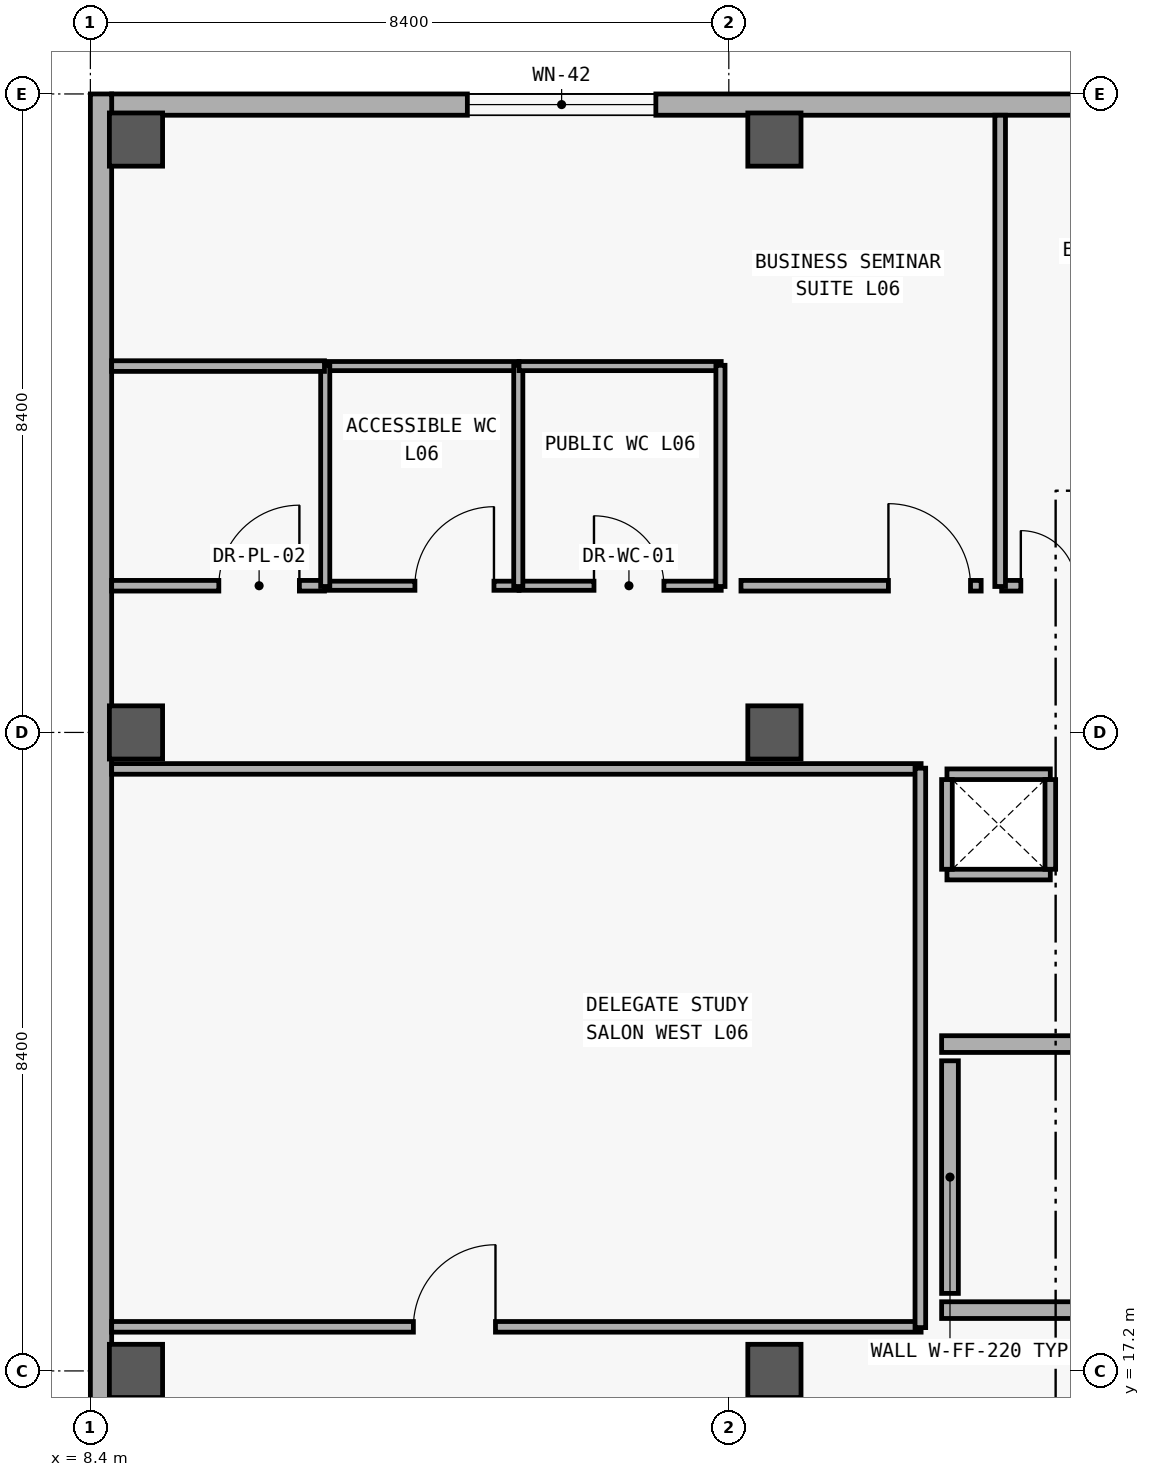
"""IFC4 building model, lengths in metres.
Left out: names, types, materials, properties, quantities, classifications, styles, units other than length and angle.
Written with IfcOpenShell. Run it as: python <this file> out.ifc"""

import sys

from ifc_helpers import new_model, si_unit, direction, frame, frame_2d, origin, origin_2d, place, context, subcontext, project, spatial, rectangle, extrude, element, fill, save


model = new_model("IFC4")
c1 = context("Model", 3, precision=1e-05, world=origin(), true_north=direction((0.0, 1.0)))
c2 = subcontext(c1, "Body", "Model", "MODEL_VIEW")
j1 = project(units=[si_unit("LENGTHUNIT", "METRE"), si_unit("PLANEANGLEUNIT", "RADIAN")], contexts=[c1])
p1 = place(None, origin())
s1 = spatial("IfcSite", under=j1, at=p1, CompositionType="ELEMENT")
p2 = place(p1, origin())
s2 = spatial("IfcBuilding", under=s1, at=p2, CompositionType="ELEMENT")
p3 = place(p2, frame((0.0, 0.0, 26.4)))
s3 = spatial("IfcBuildingStorey", under=s2, at=p3, CompositionType="ELEMENT", Elevation=26.4)
for number, where, z_axis, x_axis in (
    (1, (9.0, 17.2, 0.0), (0.0, 0.0, 1.0), (1.0, 0.0, 0.0)),
    (2, (9.0, 25.6, 0.0), (0.0, 0.0, 1.0), (1.0, 0.0, 0.0)),
    (3, (9.0, 33.4, 0.0), (0.0, 0.0, 1.0), (1.0, 0.0, 0.0)),
    (4, (17.4, 17.2, 0.0), (0.0, 0.0, 1.0), (1.0, 0.0, 0.0)),
    (5, (17.4, 25.6, 0.0), (0.0, 0.0, 1.0), (1.0, 0.0, 0.0)),
    (6, (17.4, 33.4, 0.0), (0.0, 0.0, 1.0), (1.0, 0.0, 0.0)),
):
    element("IfcColumn", number, at=place(p3, frame(where, z_axis=z_axis, x_axis=x_axis)), inside=s3, PredefinedType="COLUMN", context=c2, shape_type="SweptSolid", body=[
        extrude(rectangle(XDim=0.7, YDim=0.7, at=origin_2d()), origin(), (0.0, 0.0, 1.0), 3.6),
    ])
p4 = place(p3, frame((8.68, 33.86, 0.0), z_axis=(0.0, 0.0, 1.0), x_axis=(1.0, 0.0, 0.0)))
e7 = element("IfcWall", 7, at=p4, inside=s3, PredefinedType="SOLIDWALL", context=c2, shape_type="SweptSolid", body=[
    extrude(rectangle(XDim=66.64, YDim=0.28, at=frame_2d((33.32, 0.0))), origin(), (0.0, 0.0, 1.0), 3.32),
])
p5 = place(p4, frame((4.68, 0.0, 0.85)))
e8 = element("IfcOpeningElement", 8, at=p5, cuts=e7, PredefinedType="OPENING", context=c2, shape_type="SweptSolid", body=[
    extrude(rectangle(XDim=2.48, YDim=2.0, at=frame_2d((1.24, 1.0))), frame((0.0, 0.15, 0.0), z_axis=(0.0, -1.0, 0.0), x_axis=(1.0, 0.0, 0.0)), (0.0, 0.0, 1.0), 0.3),
])
p6 = place(p4, frame((12.829, 0.0, 0.85)))
e9 = element("IfcOpeningElement", 9, at=p6, cuts=e7, PredefinedType="OPENING", context=c2, shape_type="SweptSolid", body=[
    extrude(rectangle(XDim=1.65, YDim=1.75, at=frame_2d((0.825, 0.875))), frame((0.0, 0.15, 0.0), z_axis=(0.0, -1.0, 0.0), x_axis=(1.0, 0.0, 0.0)), (0.0, 0.0, 1.0), 0.3),
])
p7 = place(p4, frame((16.588, 0.0, 0.85)))
e10 = element("IfcOpeningElement", 10, at=p7, cuts=e7, PredefinedType="OPENING", context=c2, shape_type="SweptSolid", body=[
    extrude(rectangle(XDim=1.95, YDim=1.75, at=frame_2d((0.975, 0.875))), frame((0.0, 0.15, 0.0), z_axis=(0.0, -1.0, 0.0), x_axis=(1.0, 0.0, 0.0)), (0.0, 0.0, 1.0), 0.3),
])
p8 = place(p4, frame((20.347, 0.0, 0.85)))
e11 = element("IfcOpeningElement", 11, at=p8, cuts=e7, PredefinedType="OPENING", context=c2, shape_type="SweptSolid", body=[
    extrude(rectangle(XDim=2.25, YDim=1.75, at=frame_2d((1.125, 0.875))), frame((0.0, 0.15, 0.0), z_axis=(0.0, -1.0, 0.0), x_axis=(1.0, 0.0, 0.0)), (0.0, 0.0, 1.0), 0.3),
])
p9 = place(p4, frame((24.105, 0.0, 0.85)))
e12 = element("IfcOpeningElement", 12, at=p9, cuts=e7, PredefinedType="OPENING", context=c2, shape_type="SweptSolid", body=[
    extrude(rectangle(XDim=2.55, YDim=1.8, at=frame_2d((1.275, 0.9))), frame((0.0, 0.15, 0.0), z_axis=(0.0, -1.0, 0.0), x_axis=(1.0, 0.0, 0.0)), (0.0, 0.0, 1.0), 0.3),
])
p10 = place(p4, frame((27.864, 0.0, 0.85)))
e13 = element("IfcOpeningElement", 13, at=p10, cuts=e7, PredefinedType="OPENING", context=c2, shape_type="SweptSolid", body=[
    extrude(rectangle(XDim=2.85, YDim=1.85, at=frame_2d((1.425, 0.925))), frame((0.0, 0.15, 0.0), z_axis=(0.0, -1.0, 0.0), x_axis=(1.0, 0.0, 0.0)), (0.0, 0.0, 1.0), 0.3),
])
p11 = place(p4, frame((32.497, 0.0, 0.85)))
e14 = element("IfcOpeningElement", 14, at=p11, cuts=e7, PredefinedType="OPENING", context=c2, shape_type="SweptSolid", body=[
    extrude(rectangle(XDim=1.4, YDim=1.6, at=frame_2d((0.7, 0.8))), frame((0.0, 0.15, 0.0), z_axis=(0.0, -1.0, 0.0), x_axis=(1.0, 0.0, 0.0)), (0.0, 0.0, 1.0), 0.3),
])
p12 = place(p4, frame((36.306, 0.0, 0.85)))
e15 = element("IfcOpeningElement", 15, at=p12, cuts=e7, PredefinedType="OPENING", context=c2, shape_type="SweptSolid", body=[
    extrude(rectangle(XDim=1.6, YDim=1.6, at=frame_2d((0.8, 0.8))), frame((0.0, 0.15, 0.0), z_axis=(0.0, -1.0, 0.0), x_axis=(1.0, 0.0, 0.0)), (0.0, 0.0, 1.0), 0.3),
])
p13 = place(p4, frame((40.115, 0.0, 0.85)))
e16 = element("IfcOpeningElement", 16, at=p13, cuts=e7, PredefinedType="OPENING", context=c2, shape_type="SweptSolid", body=[
    extrude(rectangle(XDim=1.8, YDim=1.6, at=frame_2d((0.9, 0.8))), frame((0.0, 0.15, 0.0), z_axis=(0.0, -1.0, 0.0), x_axis=(1.0, 0.0, 0.0)), (0.0, 0.0, 1.0), 0.3),
])
p14 = place(p4, frame((43.923, 0.0, 0.85)))
e17 = element("IfcOpeningElement", 17, at=p14, cuts=e7, PredefinedType="OPENING", context=c2, shape_type="SweptSolid", body=[
    extrude(rectangle(XDim=2.0, YDim=1.65, at=frame_2d((1.0, 0.825))), frame((0.0, 0.15, 0.0), z_axis=(0.0, -1.0, 0.0), x_axis=(1.0, 0.0, 0.0)), (0.0, 0.0, 1.0), 0.3),
])
p15 = place(p4, frame((47.731, 0.0, 0.85)))
e18 = element("IfcOpeningElement", 18, at=p15, cuts=e7, PredefinedType="OPENING", context=c2, shape_type="SweptSolid", body=[
    extrude(rectangle(XDim=2.2, YDim=1.65, at=frame_2d((1.1, 0.825))), frame((0.0, 0.15, 0.0), z_axis=(0.0, -1.0, 0.0), x_axis=(1.0, 0.0, 0.0)), (0.0, 0.0, 1.0), 0.3),
])
p16 = place(p4, frame((51.44, 0.0, 0.85)))
e19 = element("IfcOpeningElement", 19, at=p16, cuts=e7, PredefinedType="OPENING", context=c2, shape_type="SweptSolid", body=[
    extrude(rectangle(XDim=2.6, YDim=2.2, at=frame_2d((1.3, 1.1))), frame((0.0, 0.15, 0.0), z_axis=(0.0, -1.0, 0.0), x_axis=(1.0, 0.0, 0.0)), (0.0, 0.0, 1.0), 0.3),
])
p17 = place(p4, frame((56.024, 0.0, 0.85)))
e20 = element("IfcOpeningElement", 20, at=p17, cuts=e7, PredefinedType="OPENING", context=c2, shape_type="SweptSolid", body=[
    extrude(rectangle(XDim=1.25, YDim=1.45, at=frame_2d((0.625, 0.725))), frame((0.0, 0.15, 0.0), z_axis=(0.0, -1.0, 0.0), x_axis=(1.0, 0.0, 0.0)), (0.0, 0.0, 1.0), 0.3),
])
p18 = place(p4, frame((59.882, 0.0, 0.85)))
e21 = element("IfcOpeningElement", 21, at=p18, cuts=e7, PredefinedType="OPENING", context=c2, shape_type="SweptSolid", body=[
    extrude(rectangle(XDim=1.35, YDim=1.55, at=frame_2d((0.675, 0.775))), frame((0.0, 0.15, 0.0), z_axis=(0.0, -1.0, 0.0), x_axis=(1.0, 0.0, 0.0)), (0.0, 0.0, 1.0), 0.3),
])
p19 = place(p4, frame((63.74, 0.0, 0.85)))
e22 = element("IfcOpeningElement", 22, at=p19, cuts=e7, PredefinedType="OPENING", context=c2, shape_type="SweptSolid", body=[
    extrude(rectangle(XDim=1.45, YDim=1.65, at=frame_2d((0.725, 0.825))), frame((0.0, 0.15, 0.0), z_axis=(0.0, -1.0, 0.0), x_axis=(1.0, 0.0, 0.0)), (0.0, 0.0, 1.0), 0.3),
])
p20 = place(p3, frame((8.54, 8.8, 0.0), z_axis=(0.0, 0.0, 1.0), x_axis=(0.0, 1.0, 0.0)))
e23 = element("IfcWall", 23, at=p20, inside=s3, PredefinedType="SOLIDWALL", context=c2, shape_type="SweptSolid", body=[
    extrude(rectangle(XDim=25.2, YDim=0.28, at=frame_2d((12.6, 0.0))), origin(), (0.0, 0.0, 1.0), 3.32),
])
p21 = place(p20, frame((1.7, 0.0, 0.95)))
e24 = element("IfcOpeningElement", 24, at=p21, cuts=e23, PredefinedType="OPENING", context=c2, shape_type="SweptSolid", body=[
    extrude(rectangle(XDim=1.6, YDim=1.6, at=frame_2d((0.8, 0.8))), frame((0.0, 0.15, 0.0), z_axis=(0.0, -1.0, 0.0), x_axis=(1.0, 0.0, 0.0)), (0.0, 0.0, 1.0), 0.3),
])
p22 = place(p3, frame((19.6, 18.0, 0.0), z_axis=(0.0, 0.0, 1.0), x_axis=(1.0, 0.0, 0.0)))
e25 = element("IfcWall", 25, at=p22, inside=s3, PredefinedType="SOLIDWALL", context=c2, shape_type="SweptSolid", body=[
    extrude(rectangle(XDim=4.8, YDim=0.22, at=frame_2d((2.4, 0.0))), origin(), (0.0, 0.0, 1.0), 2.47),
])
p23 = place(p3, frame((19.6, 21.5, 0.0), z_axis=(0.0, 0.0, 1.0), x_axis=(1.0, 0.0, 0.0)))
e26 = element("IfcWall", 26, at=p23, inside=s3, PredefinedType="SOLIDWALL", context=c2, shape_type="SweptSolid", body=[
    extrude(rectangle(XDim=4.8, YDim=0.22, at=frame_2d((2.4, 0.0))), origin(), (0.0, 0.0, 1.0), 2.47),
])
p24 = place(p23, frame((2.05, 0.0, 0.0)))
e27 = element("IfcOpeningElement", 27, at=p24, cuts=e26, PredefinedType="OPENING", context=c2, shape_type="SweptSolid", body=[
    extrude(rectangle(XDim=1.25, YDim=2.2, at=frame_2d((0.625, 1.1))), frame((0.0, 0.12, 0.0), z_axis=(0.0, -1.0, 0.0), x_axis=(1.0, 0.0, 0.0)), (0.0, 0.0, 1.0), 0.24),
])
p25 = place(p3, frame((19.71, 18.22, 0.0), z_axis=(0.0, 0.0, 1.0), x_axis=(0.0, 1.0, 0.0)))
e28 = element("IfcWall", 28, at=p25, inside=s3, PredefinedType="SOLIDWALL", context=c2, shape_type="SweptSolid", body=[
    extrude(rectangle(XDim=3.06, YDim=0.22, at=frame_2d((1.53, 0.0))), origin(), (0.0, 0.0, 1.0), 2.47),
])
p26 = place(p3, frame((11.48, 27.53, 0.0), z_axis=(0.0, 0.0, 1.0), x_axis=(1.0, 0.0, 0.0)))
e29 = element("IfcWall", 29, at=p26, inside=s3, PredefinedType="PARTITIONING", context=c2, shape_type="SweptSolid", body=[
    extrude(rectangle(XDim=2.56, YDim=0.12, at=frame_2d((1.28, 0.0))), origin(), (0.0, 0.0, 1.0), 2.48),
])
p27 = place(p26, frame((1.19, 0.0, 0.0)))
e30 = element("IfcOpeningElement", 30, at=p27, cuts=e29, PredefinedType="OPENING", context=c2, shape_type="SweptSolid", body=[
    extrude(rectangle(XDim=1.04, YDim=2.15, at=frame_2d((0.52, 1.075))), frame((0.0, 0.07, 0.0), z_axis=(0.0, -1.0, 0.0), x_axis=(1.0, 0.0, 0.0)), (0.0, 0.0, 1.0), 0.14),
])
p28 = place(p3, frame((14.04, 27.53, 0.0), z_axis=(0.0, 0.0, 1.0), x_axis=(1.0, 0.0, 0.0)))
e31 = element("IfcWall", 31, at=p28, inside=s3, PredefinedType="PARTITIONING", context=c2, shape_type="SweptSolid", body=[
    extrude(rectangle(XDim=2.66, YDim=0.12, at=frame_2d((1.33, 0.0))), origin(), (0.0, 0.0, 1.0), 2.48),
])
p29 = place(p28, frame((0.986, 0.0, 0.0)))
e32 = element("IfcOpeningElement", 32, at=p29, cuts=e31, PredefinedType="OPENING", context=c2, shape_type="SweptSolid", body=[
    extrude(rectangle(XDim=0.92, YDim=2.15, at=frame_2d((0.46, 1.075))), frame((0.0, 0.07, 0.0), z_axis=(0.0, -1.0, 0.0), x_axis=(1.0, 0.0, 0.0)), (0.0, 0.0, 1.0), 0.14),
])
p30 = place(p3, frame((8.68, 17.78, 0.0), z_axis=(0.0, 0.0, 1.0), x_axis=(1.0, 0.0, 0.0)))
e33 = element("IfcWall", 33, at=p30, inside=s3, PredefinedType="PARTITIONING", context=c2, shape_type="SweptSolid", body=[
    extrude(rectangle(XDim=10.65, YDim=0.14, at=frame_2d((5.325, 0.0))), origin(), (0.0, 0.0, 1.0), 2.48),
])
p31 = place(p30, frame((3.97, 0.0, 0.0)))
e34 = element("IfcOpeningElement", 34, at=p31, cuts=e33, PredefinedType="OPENING", context=c2, shape_type="SweptSolid", body=[
    extrude(rectangle(XDim=1.08, YDim=2.25, at=frame_2d((0.54, 1.125))), frame((0.0, 0.08, 0.0), z_axis=(0.0, -1.0, 0.0), x_axis=(1.0, 0.0, 0.0)), (0.0, 0.0, 1.0), 0.16),
])
p32 = place(p3, frame((8.68, 27.53, 0.0), z_axis=(0.0, 0.0, 1.0), x_axis=(1.0, 0.0, 0.0)))
e35 = element("IfcWall", 35, at=p32, inside=s3, PredefinedType="PARTITIONING", context=c2, shape_type="SweptSolid", body=[
    extrude(rectangle(XDim=2.8, YDim=0.14, at=frame_2d((1.4, 0.0))), origin(), (0.0, 0.0, 1.0), 2.48),
])
p33 = place(p32, frame((1.41, 0.0, 0.0)))
e36 = element("IfcOpeningElement", 36, at=p33, cuts=e35, PredefinedType="OPENING", context=c2, shape_type="SweptSolid", body=[
    extrude(rectangle(XDim=1.06, YDim=2.2, at=frame_2d((0.53, 1.1))), frame((0.0, 0.08, 0.0), z_axis=(0.0, -1.0, 0.0), x_axis=(1.0, 0.0, 0.0)), (0.0, 0.0, 1.0), 0.16),
])
p34 = place(p3, frame((16.96, 27.53, 0.0), z_axis=(0.0, 0.0, 1.0), x_axis=(1.0, 0.0, 0.0)))
e37 = element("IfcWall", 37, at=p34, inside=s3, PredefinedType="PARTITIONING", context=c2, shape_type="SweptSolid", body=[
    extrude(rectangle(XDim=3.16, YDim=0.14, at=frame_2d((1.58, 0.0))), origin(), (0.0, 0.0, 1.0), 2.48),
])
p35 = place(p34, frame((1.94, 0.0, 0.0)))
e38 = element("IfcOpeningElement", 38, at=p35, cuts=e37, PredefinedType="OPENING", context=c2, shape_type="SweptSolid", body=[
    extrude(rectangle(XDim=1.08, YDim=2.25, at=frame_2d((0.54, 1.125))), frame((0.0, 0.08, 0.0), z_axis=(0.0, -1.0, 0.0), x_axis=(1.0, 0.0, 0.0)), (0.0, 0.0, 1.0), 0.16),
])
p36 = place(p3, frame((20.39, 27.53, 0.0), z_axis=(0.0, 0.0, 1.0), x_axis=(1.0, 0.0, 0.0)))
e39 = element("IfcWall", 39, at=p36, inside=s3, PredefinedType="PARTITIONING", context=c2, shape_type="SweptSolid", body=[
    extrude(rectangle(XDim=2.512, YDim=0.14, at=frame_2d((1.256, 0.0))), origin(), (0.0, 0.0, 1.0), 2.48),
])
p37 = place(p36, frame((0.252, 0.0, 0.0)))
e40 = element("IfcOpeningElement", 40, at=p37, cuts=e39, PredefinedType="OPENING", context=c2, shape_type="SweptSolid", body=[
    extrude(rectangle(XDim=1.45, YDim=2.3, at=frame_2d((0.725, 1.15))), frame((0.0, 0.08, 0.0), z_axis=(0.0, -1.0, 0.0), x_axis=(1.0, 0.0, 0.0)), (0.0, 0.0, 1.0), 0.16),
])
p38 = place(p3, frame((11.48, 30.42, 0.0), z_axis=(0.0, 0.0, 1.0), x_axis=(1.0, 0.0, 0.0)))
e41 = element("IfcWall", 41, at=p38, inside=s3, PredefinedType="PARTITIONING", context=c2, shape_type="SweptSolid", body=[
    extrude(rectangle(XDim=2.56, YDim=0.12, at=frame_2d((1.28, 0.0))), origin(), (0.0, 0.0, 1.0), 2.48),
])
for number, where, z_axis, x_axis in (
    (42, (11.49, 27.52, 0.0), (0.0, 0.0, 1.0), (0.0, 1.0, 0.0)),
    (43, (14.03, 27.52, 0.0), (0.0, 0.0, 1.0), (0.0, 1.0, 0.0)),
):
    element("IfcWall", number, at=place(p3, frame(where, z_axis=z_axis, x_axis=x_axis)), inside=s3, PredefinedType="PARTITIONING", context=c2, shape_type="SweptSolid", body=[
        extrude(rectangle(XDim=2.91, YDim=0.12, at=frame_2d((1.455, 0.0))), origin(), (0.0, 0.0, 1.0), 2.48),
    ])
p39 = place(p3, frame((14.04, 30.42, 0.0), z_axis=(0.0, 0.0, 1.0), x_axis=(1.0, 0.0, 0.0)))
e44 = element("IfcWall", 44, at=p39, inside=s3, PredefinedType="PARTITIONING", context=c2, shape_type="SweptSolid", body=[
    extrude(rectangle(XDim=2.66, YDim=0.12, at=frame_2d((1.33, 0.0))), origin(), (0.0, 0.0, 1.0), 2.48),
])
p40 = place(p3, frame((16.69, 27.52, 0.0), z_axis=(0.0, 0.0, 1.0), x_axis=(0.0, 1.0, 0.0)))
e45 = element("IfcWall", 45, at=p40, inside=s3, PredefinedType="PARTITIONING", context=c2, shape_type="SweptSolid", body=[
    extrude(rectangle(XDim=2.91, YDim=0.12, at=frame_2d((1.455, 0.0))), origin(), (0.0, 0.0, 1.0), 2.48),
])
p41 = place(p3, frame((8.68, 25.12, 0.0), z_axis=(0.0, 0.0, 1.0), x_axis=(1.0, 0.0, 0.0)))
e46 = element("IfcWall", 46, at=p41, inside=s3, PredefinedType="PARTITIONING", context=c2, shape_type="SweptSolid", body=[
    extrude(rectangle(XDim=10.65, YDim=0.14, at=frame_2d((5.325, 0.0))), origin(), (0.0, 0.0, 1.0), 2.48),
])
p42 = place(p3, frame((19.32, 17.77, 0.0), z_axis=(0.0, 0.0, 1.0), x_axis=(0.0, 1.0, 0.0)))
e47 = element("IfcWall", 47, at=p42, inside=s3, PredefinedType="PARTITIONING", context=c2, shape_type="SweptSolid", body=[
    extrude(rectangle(XDim=7.36, YDim=0.14, at=frame_2d((3.68, 0.0))), origin(), (0.0, 0.0, 1.0), 2.48),
])
p43 = place(p3, frame((8.68, 30.42, 0.0), z_axis=(0.0, 0.0, 1.0), x_axis=(1.0, 0.0, 0.0)))
e48 = element("IfcWall", 48, at=p43, inside=s3, PredefinedType="PARTITIONING", context=c2, shape_type="SweptSolid", body=[
    extrude(rectangle(XDim=2.8, YDim=0.14, at=frame_2d((1.4, 0.0))), origin(), (0.0, 0.0, 1.0), 2.48),
])
p44 = place(p3, frame((20.37, 27.52, 0.0), z_axis=(0.0, 0.0, 1.0), x_axis=(0.0, 1.0, 0.0)))
e49 = element("IfcWall", 49, at=p44, inside=s3, PredefinedType="PARTITIONING", context=c2, shape_type="SweptSolid", body=[
    extrude(rectangle(XDim=6.2, YDim=0.14, at=frame_2d((3.1, 0.0))), origin(), (0.0, 0.0, 1.0), 2.48),
])
for number, where, z_axis, x_axis in (
    (50, (19.67, 23.73, 0.0), (0.0, 0.0, 1.0), (1.0, 0.0, 0.0)),
    (51, (21.03, 25.05, 0.0), (0.0, 0.0, 1.0), (-1.0, 0.0, 0.0)),
):
    element("IfcWall", number, at=place(p3, frame(where, z_axis=z_axis, x_axis=x_axis)), inside=s3, PredefinedType="PARTITIONING", context=c2, shape_type="SweptSolid", body=[
        extrude(rectangle(XDim=1.36, YDim=0.14, at=frame_2d((0.68, 0.0))), origin(), (0.0, 0.0, 1.0), 2.44),
    ])
for number, where, z_axis, x_axis in (
    (52, (19.67, 24.98, 0.0), (0.0, 0.0, 1.0), (0.0, -1.0, 0.0)),
    (53, (21.03, 23.8, 0.0), (0.0, 0.0, 1.0), (0.0, 1.0, 0.0)),
):
    element("IfcWall", number, at=place(p3, frame(where, z_axis=z_axis, x_axis=x_axis)), inside=s3, PredefinedType="PARTITIONING", context=c2, shape_type="SweptSolid", body=[
        extrude(rectangle(XDim=1.18, YDim=0.14, at=frame_2d((0.59, 0.0))), origin(), (0.0, 0.0, 1.0), 2.44),
    ])
p45 = place(p5, origin())
e54 = element("IfcWindow", 54, at=p45, inside=s3, PartitioningType="SINGLE_PANEL", PredefinedType="WINDOW", context=c2, shape_type="SweptSolid", body=[
    extrude(rectangle(XDim=2.48, YDim=2.0, at=frame_2d((1.24, 1.0))), frame((0.0, 0.03, 0.0), z_axis=(0.0, -1.0, 0.0), x_axis=(1.0, 0.0, 0.0)), (0.0, 0.0, 1.0), 0.06),
])
fill(e8, e54)
p46 = place(p27, origin())
e55 = element("IfcDoor", 55, at=p46, inside=s3, OperationType="SINGLE_SWING_RIGHT", PredefinedType="DOOR", context=c2, shape_type="SweptSolid", body=[
    extrude(rectangle(XDim=1.04, YDim=2.15, at=frame_2d((0.52, 1.075))), frame((0.0, 0.025, 0.0), z_axis=(0.0, -1.0, 0.0), x_axis=(1.0, 0.0, 0.0)), (0.0, 0.0, 1.0), 0.05),
])
fill(e30, e55)
p47 = place(p29, origin())
e56 = element("IfcDoor", 56, at=p47, inside=s3, OperationType="SINGLE_SWING_LEFT", PredefinedType="DOOR", context=c2, shape_type="SweptSolid", body=[
    extrude(rectangle(XDim=0.92, YDim=2.15, at=frame_2d((0.46, 1.075))), frame((0.0, 0.025, 0.0), z_axis=(0.0, -1.0, 0.0), x_axis=(1.0, 0.0, 0.0)), (0.0, 0.0, 1.0), 0.05),
])
fill(e32, e56)
p48 = place(p31, origin())
e57 = element("IfcDoor", 57, at=p48, inside=s3, OperationType="SINGLE_SWING_RIGHT", PredefinedType="DOOR", context=c2, shape_type="SweptSolid", body=[
    extrude(rectangle(XDim=1.08, YDim=2.25, at=frame_2d((0.54, 1.125))), frame((0.0, 0.025, 0.0), z_axis=(0.0, -1.0, 0.0), x_axis=(1.0, 0.0, 0.0)), (0.0, 0.0, 1.0), 0.05),
])
fill(e34, e57)
p49 = place(p33, origin())
e58 = element("IfcDoor", 58, at=p49, inside=s3, OperationType="SINGLE_SWING_RIGHT", PredefinedType="DOOR", context=c2, shape_type="SweptSolid", body=[
    extrude(rectangle(XDim=1.06, YDim=2.2, at=frame_2d((0.53, 1.1))), frame((0.0, 0.025, 0.0), z_axis=(0.0, -1.0, 0.0), x_axis=(1.0, 0.0, 0.0)), (0.0, 0.0, 1.0), 0.05),
])
fill(e36, e58)
p50 = place(p35, origin())
e59 = element("IfcDoor", 59, at=p50, inside=s3, OperationType="SINGLE_SWING_LEFT", PredefinedType="DOOR", context=c2, shape_type="SweptSolid", body=[
    extrude(rectangle(XDim=1.08, YDim=2.25, at=frame_2d((0.54, 1.125))), frame((0.0, 0.025, 0.0), z_axis=(0.0, -1.0, 0.0), x_axis=(1.0, 0.0, 0.0)), (0.0, 0.0, 1.0), 0.05),
])
fill(e38, e59)
p51 = place(p37, origin())
e60 = element("IfcDoor", 60, at=p51, inside=s3, OperationType="DOUBLE_DOOR_SINGLE_SWING", PredefinedType="DOOR", context=c2, shape_type="SweptSolid", body=[
    extrude(rectangle(XDim=1.45, YDim=2.3, at=frame_2d((0.725, 1.15))), frame((0.0, 0.025, 0.0), z_axis=(0.0, -1.0, 0.0), x_axis=(1.0, 0.0, 0.0)), (0.0, 0.0, 1.0), 0.05),
])
fill(e40, e60)
save(model, sys.argv[1])
